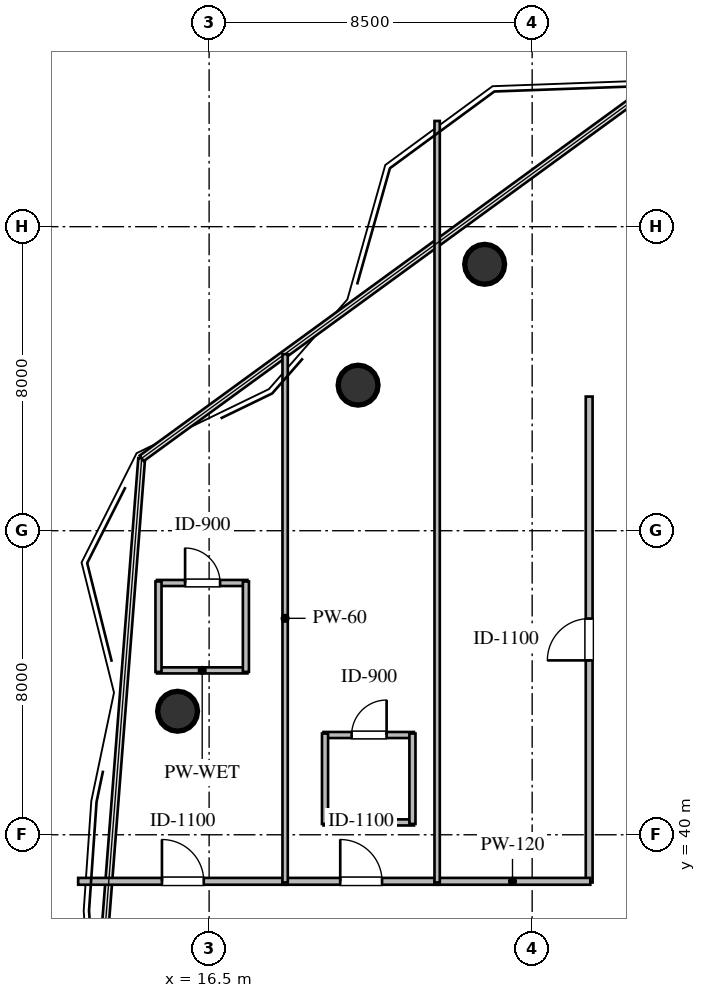
"""IFC4 building model, lengths in metres.
Left out: names, types, materials, properties, quantities, classifications, styles, units other than length and angle.
Written with IfcOpenShell. Run it as: python <this file> out.ifc"""

import sys

from ifc_helpers import new_model, si_unit, direction, frame, frame_2d, origin, origin_2d, place, context, subcontext, project, spatial, rectangle, circle, extrude, element, fill, save


model = new_model("IFC4")
c1 = context("Model", 3, precision=1e-05, world=origin(), true_north=direction((0.0, 1.0)))
c2 = subcontext(c1, "Body", "Model", "MODEL_VIEW")
j1 = project(units=[si_unit("LENGTHUNIT", "METRE"), si_unit("PLANEANGLEUNIT", "RADIAN")], contexts=[c1])
p1 = place(None, origin())
s1 = spatial("IfcSite", under=j1, at=p1, CompositionType="ELEMENT")
p2 = place(p1, origin())
s2 = spatial("IfcBuilding", under=s1, at=p2, CompositionType="ELEMENT")
p3 = place(p2, frame((0.0, 0.0, 210.0)))
s3 = spatial("IfcBuildingStorey", under=s2, at=p3, CompositionType="ELEMENT", Elevation=210.0)
for number, where, z_axis, x_axis in (
    (1, (23.75, 55.01, 0.0), (0.0, 0.0, 1.0), (1.0, 0.0, 0.0)),
    (2, (20.42, 51.83, 0.0), (0.0, 0.0, 1.0), (1.0, 0.0, 0.0)),
    (3, (15.67, 43.25, 0.0), (0.0, 0.0, 1.0), (1.0, 0.0, 0.0)),
):
    element("IfcColumn", number, at=place(p3, frame(where, z_axis=z_axis, x_axis=x_axis)), inside=s3, PredefinedType="COLUMN", context=c2, shape_type="SweptSolid", body=[
        extrude(circle(Radius=0.525, at=origin_2d()), origin(), (0.0, 0.0, 1.0), 3.6),
    ])
p4 = place(p3, frame((15.128, 44.325, 0.0), z_axis=(0.0, 0.0, 1.0), x_axis=(1.0, 0.0, 0.0)))
e4 = element("IfcWall", 4, at=p4, inside=s3, PredefinedType="PLUMBINGWALL", context=c2, shape_type="SweptSolid", body=[
    extrude(rectangle(XDim=2.38, YDim=0.16, at=frame_2d((1.19, 0.0))), origin(), (0.0, 0.0, 1.0), 3.36),
])
p5 = place(p3, frame((15.128, 46.625, 0.0), z_axis=(0.0, 0.0, 1.0), x_axis=(1.0, 0.0, 0.0)))
e5 = element("IfcWall", 5, at=p5, inside=s3, PredefinedType="PLUMBINGWALL", context=c2, shape_type="SweptSolid", body=[
    extrude(rectangle(XDim=2.38, YDim=0.16, at=frame_2d((1.19, 0.0))), origin(), (0.0, 0.0, 1.0), 3.36),
])
p6 = place(p5, frame((0.74, 0.0, 0.0)))
e6 = element("IfcOpeningElement", 6, at=p6, cuts=e5, PredefinedType="OPENING", context=c2, shape_type="SweptSolid", body=[
    extrude(rectangle(XDim=0.92, YDim=2.1, at=frame_2d((0.46, 1.05))), frame((0.0, 0.09, 0.0), z_axis=(0.0, -1.0, 0.0), x_axis=(1.0, 0.0, 0.0)), (0.0, 0.0, 1.0), 0.18),
])
for number, where, z_axis, x_axis in (
    (7, (15.168, 44.285, 0.0), (0.0, 0.0, 1.0), (0.0, 1.0, 0.0)),
    (8, (17.468, 44.285, 0.0), (0.0, 0.0, 1.0), (0.0, 1.0, 0.0)),
):
    element("IfcWall", number, at=place(p3, frame(where, z_axis=z_axis, x_axis=x_axis)), inside=s3, PredefinedType="PLUMBINGWALL", context=c2, shape_type="SweptSolid", body=[
        extrude(rectangle(XDim=2.38, YDim=0.16, at=frame_2d((1.19, 0.0))), origin(), (0.0, 0.0, 1.0), 3.36),
    ])
p7 = place(p3, frame((19.51, 40.325, 0.0), z_axis=(0.0, 0.0, 1.0), x_axis=(1.0, 0.0, 0.0)))
e9 = element("IfcWall", 9, at=p7, inside=s3, PredefinedType="PLUMBINGWALL", context=c2, shape_type="SweptSolid", body=[
    extrude(rectangle(XDim=2.38, YDim=0.16, at=frame_2d((1.19, 0.0))), origin(), (0.0, 0.0, 1.0), 3.36),
])
p8 = place(p3, frame((19.51, 42.625, 0.0), z_axis=(0.0, 0.0, 1.0), x_axis=(1.0, 0.0, 0.0)))
e10 = element("IfcWall", 10, at=p8, inside=s3, PredefinedType="PLUMBINGWALL", context=c2, shape_type="SweptSolid", body=[
    extrude(rectangle(XDim=2.38, YDim=0.16, at=frame_2d((1.19, 0.0))), origin(), (0.0, 0.0, 1.0), 3.36),
])
p9 = place(p8, frame((0.74, 0.0, 0.0)))
e11 = element("IfcOpeningElement", 11, at=p9, cuts=e10, PredefinedType="OPENING", context=c2, shape_type="SweptSolid", body=[
    extrude(rectangle(XDim=0.92, YDim=2.1, at=frame_2d((0.46, 1.05))), frame((0.0, 0.09, 0.0), z_axis=(0.0, -1.0, 0.0), x_axis=(1.0, 0.0, 0.0)), (0.0, 0.0, 1.0), 0.18),
])
p10 = place(p3, frame((19.55, 40.285, 0.0), z_axis=(0.0, 0.0, 1.0), x_axis=(0.0, 1.0, 0.0)))
e12 = element("IfcWall", 12, at=p10, inside=s3, PredefinedType="PLUMBINGWALL", context=c2, shape_type="SweptSolid", body=[
    extrude(rectangle(XDim=2.38, YDim=0.16, at=frame_2d((1.19, 0.0))), origin(), (0.0, 0.0, 1.0), 3.36),
])
p11 = place(p3, frame((21.85, 40.285, 0.0), z_axis=(0.0, 0.0, 1.0), x_axis=(0.0, 1.0, 0.0)))
e13 = element("IfcWall", 13, at=p11, inside=s3, PredefinedType="PLUMBINGWALL", context=c2, shape_type="SweptSolid", body=[
    extrude(rectangle(XDim=2.38, YDim=0.16, at=frame_2d((1.19, 0.0))), origin(), (0.0, 0.0, 1.0), 2.89),
])
p12 = place(p3, frame((13.054, 38.775, 0.0), z_axis=(0.0, 0.0, 1.0), x_axis=(1.0, 0.0, 0.0)))
e14 = element("IfcWall", 14, at=p12, inside=s3, PredefinedType="PARTITIONING", context=c2, shape_type="SweptSolid", body=[
    extrude(rectangle(XDim=5.511, YDim=0.18, at=frame_2d((2.755, 0.0))), origin(), (0.0, 0.0, 1.0), 3.36),
])
p13 = place(p12, frame((2.205, 0.0, 0.0)))
e15 = element("IfcOpeningElement", 15, at=p13, cuts=e14, PredefinedType="OPENING", context=c2, shape_type="SweptSolid", body=[
    extrude(rectangle(XDim=1.1, YDim=2.1, at=frame_2d((0.55, 1.05))), frame((0.0, 0.1, 0.0), z_axis=(0.0, -1.0, 0.0), x_axis=(1.0, 0.0, 0.0)), (0.0, 0.0, 1.0), 0.2),
])
p14 = place(p3, frame((18.435, 38.775, 0.0), z_axis=(0.0, 0.0, 1.0), x_axis=(1.0, 0.0, 0.0)))
e16 = element("IfcWall", 16, at=p14, inside=s3, PredefinedType="PARTITIONING", context=c2, shape_type="SweptSolid", body=[
    extrude(rectangle(XDim=4.13, YDim=0.18, at=frame_2d((2.065, 0.0))), origin(), (0.0, 0.0, 1.0), 3.36),
])
p15 = place(p14, frame((1.515, 0.0, 0.0)))
e17 = element("IfcOpeningElement", 17, at=p15, cuts=e16, PredefinedType="OPENING", context=c2, shape_type="SweptSolid", body=[
    extrude(rectangle(XDim=1.1, YDim=2.1, at=frame_2d((0.55, 1.05))), frame((0.0, 0.1, 0.0), z_axis=(0.0, -1.0, 0.0), x_axis=(1.0, 0.0, 0.0)), (0.0, 0.0, 1.0), 0.2),
])
p16 = place(p3, frame((26.5, 38.745, 0.0), z_axis=(0.0, 0.0, 1.0), x_axis=(0.0, 1.0, 0.0)))
e18 = element("IfcWall", 18, at=p16, inside=s3, PredefinedType="PARTITIONING", context=c2, shape_type="SweptSolid", body=[
    extrude(rectangle(XDim=12.785, YDim=0.18, at=frame_2d((6.393, 0.0))), origin(), (0.0, 0.0, 1.0), 3.36),
])
p17 = place(p16, frame((5.843, 0.0, 0.0)))
e19 = element("IfcOpeningElement", 19, at=p17, cuts=e18, PredefinedType="OPENING", context=c2, shape_type="SweptSolid", body=[
    extrude(rectangle(XDim=1.1, YDim=2.1, at=frame_2d((0.55, 1.05))), frame((0.0, 0.1, 0.0), z_axis=(0.0, -1.0, 0.0), x_axis=(1.0, 0.0, 0.0)), (0.0, 0.0, 1.0), 0.2),
])
p18 = place(p3, frame((22.435, 38.775, 0.0), z_axis=(0.0, 0.0, 1.0), x_axis=(1.0, 0.0, 0.0)))
e20 = element("IfcWall", 20, at=p18, inside=s3, PredefinedType="PARTITIONING", context=c2, shape_type="SweptSolid", body=[
    extrude(rectangle(XDim=4.095, YDim=0.18, at=frame_2d((2.047, 0.0))), origin(), (0.0, 0.0, 1.0), 3.36),
])
p19 = place(p3, frame((18.5, 52.645, 0.0), z_axis=(0.0, 0.0, 1.0), x_axis=(0.0, -1.0, 0.0)))
e21 = element("IfcWall", 21, at=p19, inside=s3, PredefinedType="PARTITIONING", context=c2, shape_type="SweptSolid", body=[
    extrude(rectangle(XDim=13.9, YDim=0.14, at=frame_2d((6.95, 0.0))), origin(), (0.0, 0.0, 1.0), 3.36),
])
p20 = place(p3, frame((22.5, 58.782, 0.0), z_axis=(0.0, 0.0, 1.0), x_axis=(0.0, -1.0, 0.0)))
e22 = element("IfcWall", 22, at=p20, inside=s3, PredefinedType="PARTITIONING", context=c2, shape_type="SweptSolid", body=[
    extrude(rectangle(XDim=20.037, YDim=0.14, at=frame_2d((10.019, 0.0))), origin(), (0.0, 0.0, 1.0), 2.89),
])
p21 = place(p6, origin())
e23 = element("IfcDoor", 23, at=p21, inside=s3, OperationType="SINGLE_SWING_LEFT", PredefinedType="DOOR", context=c2, shape_type="SweptSolid", body=[
    extrude(rectangle(XDim=0.92, YDim=2.1, at=frame_2d((0.46, 1.05))), frame((0.0, 0.025, 0.0), z_axis=(0.0, -1.0, 0.0), x_axis=(1.0, 0.0, 0.0)), (0.0, 0.0, 1.0), 0.05),
])
fill(e6, e23)
p22 = place(p9, origin())
e24 = element("IfcDoor", 24, at=p22, inside=s3, OperationType="SINGLE_SWING_RIGHT", PredefinedType="DOOR", context=c2, shape_type="SweptSolid", body=[
    extrude(rectangle(XDim=0.92, YDim=2.1, at=frame_2d((0.46, 1.05))), frame((0.0, 0.025, 0.0), z_axis=(0.0, -1.0, 0.0), x_axis=(1.0, 0.0, 0.0)), (0.0, 0.0, 1.0), 0.05),
])
fill(e11, e24)
p23 = place(p13, origin())
e25 = element("IfcDoor", 25, at=p23, inside=s3, OperationType="SINGLE_SWING_LEFT", PredefinedType="DOOR", context=c2, shape_type="SweptSolid", body=[
    extrude(rectangle(XDim=1.1, YDim=2.1, at=frame_2d((0.55, 1.05))), frame((0.0, 0.025, 0.0), z_axis=(0.0, -1.0, 0.0), x_axis=(1.0, 0.0, 0.0)), (0.0, 0.0, 1.0), 0.05),
])
fill(e15, e25)
p24 = place(p15, origin())
e26 = element("IfcDoor", 26, at=p24, inside=s3, OperationType="SINGLE_SWING_LEFT", PredefinedType="DOOR", context=c2, shape_type="SweptSolid", body=[
    extrude(rectangle(XDim=1.1, YDim=2.1, at=frame_2d((0.55, 1.05))), frame((0.0, 0.025, 0.0), z_axis=(0.0, -1.0, 0.0), x_axis=(1.0, 0.0, 0.0)), (0.0, 0.0, 1.0), 0.05),
])
fill(e17, e26)
p25 = place(p17, origin())
e27 = element("IfcDoor", 27, at=p25, inside=s3, OperationType="SINGLE_SWING_LEFT", PredefinedType="DOOR", context=c2, shape_type="SweptSolid", body=[
    extrude(rectangle(XDim=1.1, YDim=2.1, at=frame_2d((0.55, 1.05))), frame((0.0, 0.025, 0.0), z_axis=(0.0, -1.0, 0.0), x_axis=(1.0, 0.0, 0.0)), (0.0, 0.0, 1.0), 0.05),
])
fill(e19, e27)
save(model, sys.argv[1])
